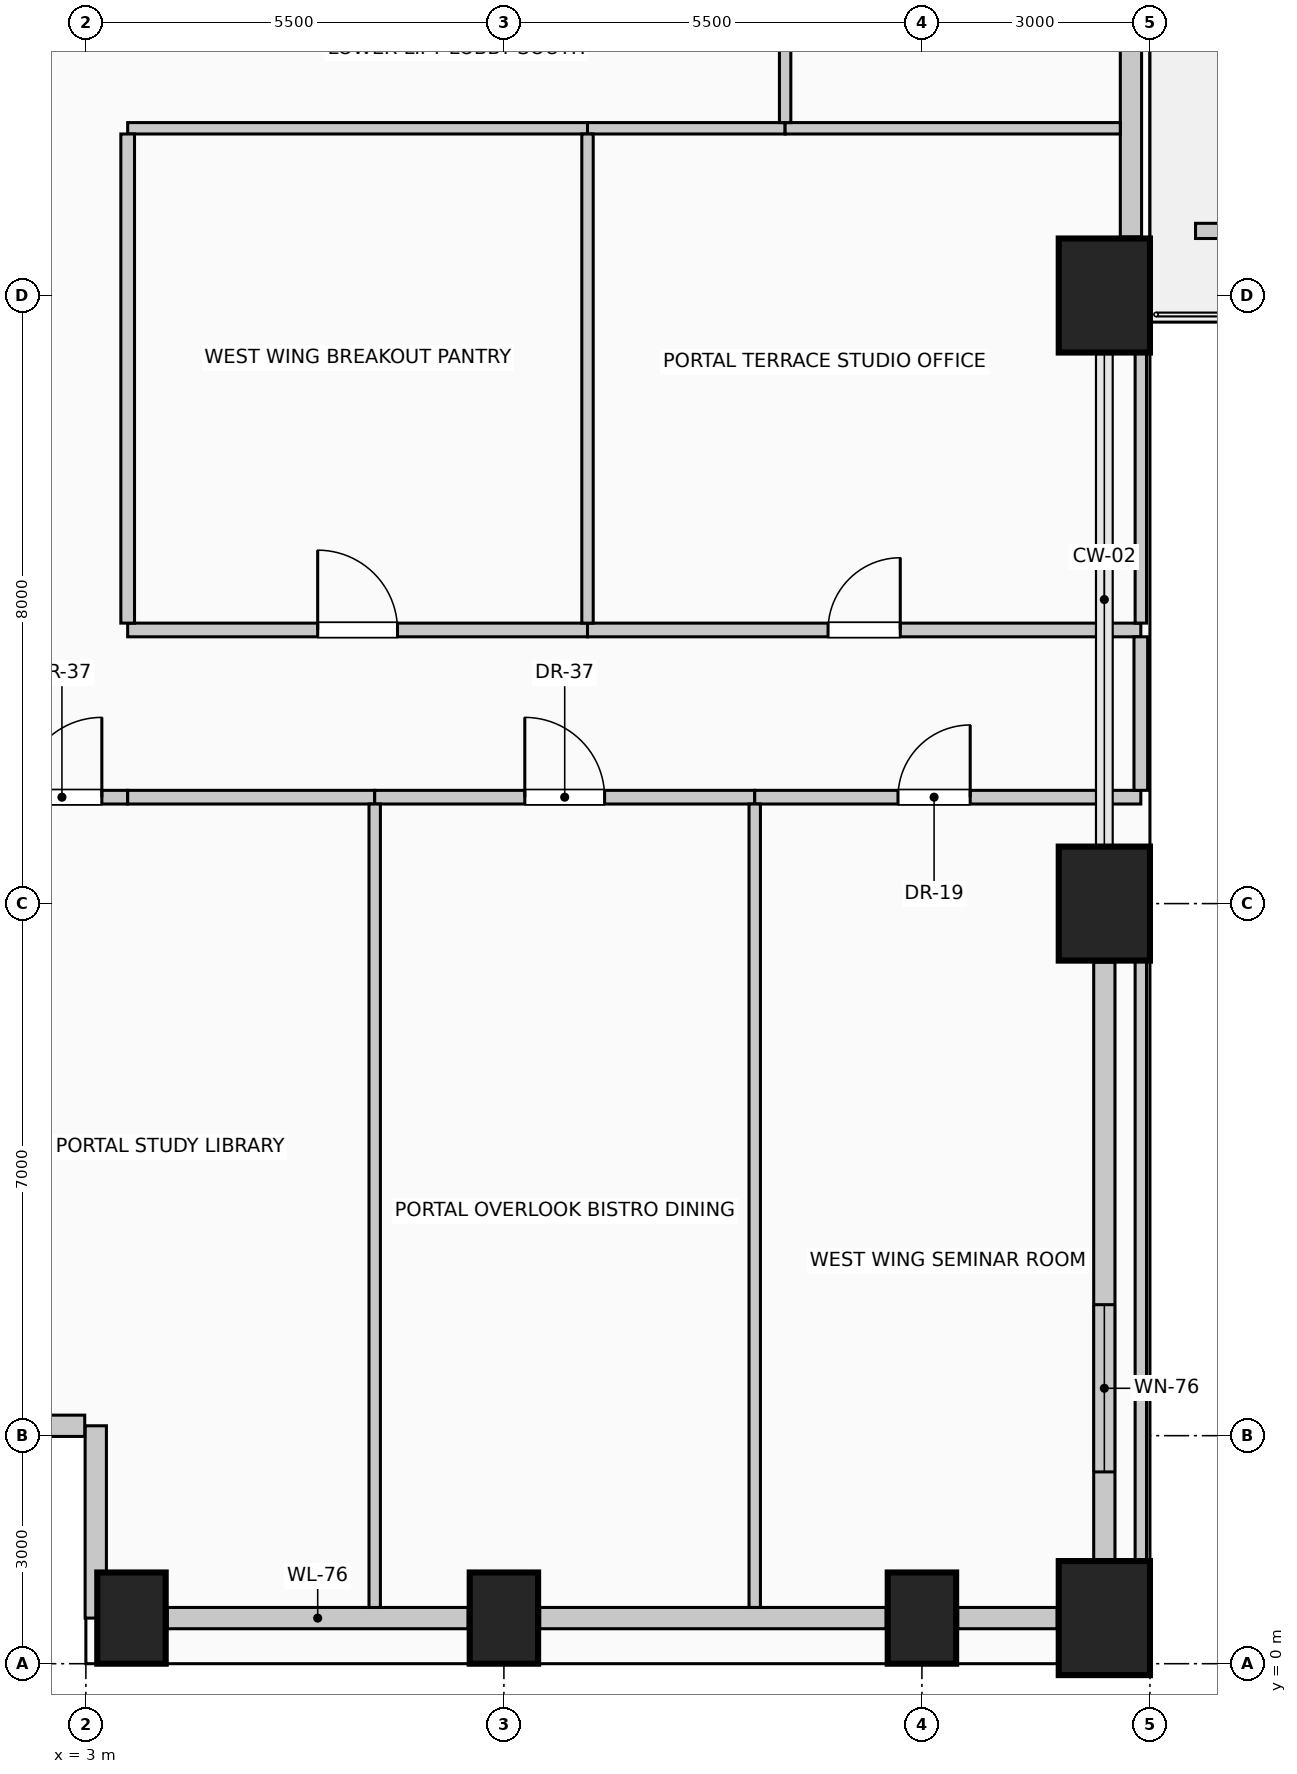
"""IFC4 building model, lengths in metres.
Left out: names, types, materials, properties, quantities, classifications, styles, units other than length and angle.
Written with IfcOpenShell. Run it as: python <this file> out.ifc"""

import sys

from ifc_helpers import new_model, si_unit, direction, frame, frame_2d, origin, origin_2d, place, context, subcontext, project, spatial, rectangle, extrude, element, fill, save


model = new_model("IFC4")
c1 = context("Model", 3, precision=1e-05, world=origin(), true_north=direction((0.0, 1.0)))
c2 = subcontext(c1, "Body", "Model", "MODEL_VIEW")
j1 = project(units=[si_unit("LENGTHUNIT", "METRE"), si_unit("PLANEANGLEUNIT", "RADIAN")], contexts=[c1])
p1 = place(None, origin())
s1 = spatial("IfcSite", under=j1, at=p1, CompositionType="ELEMENT")
p2 = place(p1, origin())
s2 = spatial("IfcBuilding", under=s1, at=p2, CompositionType="ELEMENT")
p3 = place(p2, frame((0.0, 0.0, 38.6)))
s3 = spatial("IfcBuildingStorey", under=s2, at=p3, CompositionType="ELEMENT", Elevation=38.6)
for number, where, z_axis, x_axis in (
    (1, (3.6, 0.6, 0.0), (0.0, 0.0, 1.0), (1.0, 0.0, 0.0)),
    (2, (8.5, 0.6, 0.0), (0.0, 0.0, 1.0), (1.0, 0.0, 0.0)),
    (3, (14.0, 0.6, 0.0), (0.0, 0.0, 1.0), (1.0, 0.0, 0.0)),
):
    element("IfcColumn", number, at=place(p3, frame(where, z_axis=z_axis, x_axis=x_axis)), inside=s3, PredefinedType="COLUMN", context=c2, shape_type="SweptSolid", body=[
        extrude(rectangle(XDim=0.9, YDim=1.2, at=origin_2d()), origin(), (0.0, 0.0, 1.0), 4.0),
    ])
for number, where, z_axis, x_axis in (
    (4, (16.4, 0.6, 0.0), (0.0, 0.0, 1.0), (1.0, 0.0, 0.0)),
    (5, (16.4, 10.0, 0.0), (0.0, 0.0, 1.0), (1.0, 0.0, 0.0)),
    (6, (16.4, 18.0, 0.0), (0.0, 0.0, 1.0), (1.0, 0.0, 0.0)),
):
    element("IfcColumn", number, at=place(p3, frame(where, z_axis=z_axis, x_axis=x_axis)), inside=s3, PredefinedType="COLUMN", context=c2, shape_type="SweptSolid", body=[
        extrude(rectangle(XDim=1.2, YDim=1.5, at=origin_2d()), origin(), (0.0, 0.0, 1.0), 4.0),
    ])
p4 = place(p3, frame((8.03, 0.6, 0.0), z_axis=(0.0, 0.0, 1.0), x_axis=(-1.0, 0.0, 0.0)))
e7 = element("IfcWall", 7, at=p4, inside=s3, PredefinedType="SOLIDWALL", context=c2, shape_type="SweptSolid", body=[
    extrude(rectangle(XDim=3.96, YDim=0.28, at=frame_2d((1.98, 0.0))), origin(), (0.0, 0.0, 1.0), 2.85),
])
p5 = place(p3, frame((13.53, 0.6, 0.0), z_axis=(0.0, 0.0, 1.0), x_axis=(-1.0, 0.0, 0.0)))
e8 = element("IfcWall", 8, at=p5, inside=s3, PredefinedType="SOLIDWALL", context=c2, shape_type="SweptSolid", body=[
    extrude(rectangle(XDim=4.56, YDim=0.28, at=frame_2d((2.28, 0.0))), origin(), (0.0, 0.0, 1.0), 2.85),
])
p6 = place(p3, frame((15.78, 0.6, 0.0), z_axis=(0.0, 0.0, 1.0), x_axis=(-1.0, 0.0, 0.0)))
e9 = element("IfcWall", 9, at=p6, inside=s3, PredefinedType="SOLIDWALL", context=c2, shape_type="SweptSolid", body=[
    extrude(rectangle(XDim=1.31, YDim=0.28, at=frame_2d((0.655, 0.0))), origin(), (0.0, 0.0, 1.0), 2.85),
])
p7 = place(p3, frame((3.13, 0.6, 0.0), z_axis=(0.0, 0.0, 1.0), x_axis=(0.0, 1.0, 0.0)))
e10 = element("IfcWall", 10, at=p7, inside=s3, PredefinedType="SOLIDWALL", context=c2, shape_type="SweptSolid", body=[
    extrude(rectangle(XDim=2.53, YDim=0.28, at=frame_2d((1.265, 0.0))), origin(), (0.0, 0.0, 1.0), 3.7),
])
p8 = place(p3, frame((2.985, 3.13, 0.0), z_axis=(0.0, 0.0, 1.0), x_axis=(-1.0, 0.0, 0.0)))
e11 = element("IfcWall", 11, at=p8, inside=s3, PredefinedType="SOLIDWALL", context=c2, shape_type="SweptSolid", body=[
    extrude(rectangle(XDim=2.385, YDim=0.28, at=frame_2d((1.192, 0.0))), origin(), (0.0, 0.0, 1.0), 3.7),
])
p9 = place(p3, frame((16.4, 9.23, 0.0), z_axis=(0.0, 0.0, 1.0), x_axis=(0.0, -1.0, 0.0)))
e12 = element("IfcWall", 12, at=p9, inside=s3, PredefinedType="SOLIDWALL", context=c2, shape_type="SweptSolid", body=[
    extrude(rectangle(XDim=7.86, YDim=0.28, at=frame_2d((3.93, 0.0))), origin(), (0.0, 0.0, 1.0), 3.0),
])
p10 = place(p9, frame((4.507, 0.0, 0.42)))
e13 = element("IfcOpeningElement", 13, at=p10, cuts=e12, PredefinedType="OPENING", context=c2, shape_type="SweptSolid", body=[
    extrude(rectangle(XDim=2.2, YDim=1.95, at=frame_2d((1.1, 0.975))), frame((0.0, 0.15, 0.0), z_axis=(0.0, -1.0, 0.0), x_axis=(1.0, 0.0, 0.0)), (0.0, 0.0, 1.0), 0.3),
])
p11 = place(p3, frame((16.75, 25.23, 0.0), z_axis=(0.0, 0.0, 1.0), x_axis=(0.0, -1.0, 0.0)))
e14 = element("IfcWall", 14, at=p11, inside=s3, PredefinedType="SOLIDWALL", context=c2, shape_type="SweptSolid", body=[
    extrude(rectangle(XDim=6.46, YDim=0.28, at=frame_2d((3.23, 0.0))), origin(), (0.0, 0.0, 1.0), 3.7),
])
p12 = place(p11, frame((2.63, 0.0, 0.0)))
e15 = element("IfcOpeningElement", 15, at=p12, cuts=e14, PredefinedType="OPENING", context=c2, shape_type="SweptSolid", body=[
    extrude(rectangle(XDim=1.2, YDim=2.25, at=frame_2d((0.6, 1.125))), frame((0.0, 0.15, 0.0), z_axis=(0.0, -1.0, 0.0), x_axis=(1.0, 0.0, 0.0)), (0.0, 0.0, 1.0), 0.3),
])
p13 = place(p3, frame((17.6, 18.85, 0.0), z_axis=(0.0, 0.0, 1.0), x_axis=(1.0, 0.0, 0.0)))
e16 = element("IfcWall", 16, at=p13, inside=s3, PredefinedType="USERDEFINED", context=c2, shape_type="SweptSolid", body=[
    extrude(rectangle(XDim=22.8, YDim=0.2, at=frame_2d((11.4, 0.0))), origin(), (0.0, 0.0, 1.0), 0.55),
])
p14 = place(p3, frame((0.74, 11.4, 0.0), z_axis=(0.0, 0.0, 1.0), x_axis=(1.0, 0.0, 0.0)))
e17 = element("IfcWall", 17, at=p14, inside=s3, PredefinedType="PARTITIONING", context=c2, shape_type="SweptSolid", body=[
    extrude(rectangle(XDim=2.81, YDim=0.18, at=frame_2d((1.405, 0.0))), origin(), (0.0, 0.0, 1.0), 3.095),
])
p15 = place(p14, frame((1.42, 0.0, 0.0)))
e18 = element("IfcOpeningElement", 18, at=p15, cuts=e17, PredefinedType="OPENING", context=c2, shape_type="SweptSolid", body=[
    extrude(rectangle(XDim=1.05, YDim=2.15, at=frame_2d((0.525, 1.075))), frame((0.0, 0.1, 0.0), z_axis=(0.0, -1.0, 0.0), x_axis=(1.0, 0.0, 0.0)), (0.0, 0.0, 1.0), 0.2),
])
p16 = place(p3, frame((3.55, 11.4, 0.0), z_axis=(0.0, 0.0, 1.0), x_axis=(1.0, 0.0, 0.0)))
e19 = element("IfcWall", 19, at=p16, inside=s3, PredefinedType="PARTITIONING", context=c2, shape_type="SweptSolid", body=[
    extrude(rectangle(XDim=3.25, YDim=0.18, at=frame_2d((1.625, 0.0))), origin(), (0.0, 0.0, 1.0), 3.095),
])
p17 = place(p3, frame((6.8, 11.4, 0.0), z_axis=(0.0, 0.0, 1.0), x_axis=(1.0, 0.0, 0.0)))
e20 = element("IfcWall", 20, at=p17, inside=s3, PredefinedType="PARTITIONING", context=c2, shape_type="SweptSolid", body=[
    extrude(rectangle(XDim=5.0, YDim=0.18, at=frame_2d((2.5, 0.0))), origin(), (0.0, 0.0, 1.0), 3.095),
])
p18 = place(p17, frame((1.975, 0.0, 0.0)))
e21 = element("IfcOpeningElement", 21, at=p18, cuts=e20, PredefinedType="OPENING", context=c2, shape_type="SweptSolid", body=[
    extrude(rectangle(XDim=1.05, YDim=2.15, at=frame_2d((0.525, 1.075))), frame((0.0, 0.1, 0.0), z_axis=(0.0, -1.0, 0.0), x_axis=(1.0, 0.0, 0.0)), (0.0, 0.0, 1.0), 0.2),
])
p19 = place(p3, frame((11.8, 11.4, 0.0), z_axis=(0.0, 0.0, 1.0), x_axis=(1.0, 0.0, 0.0)))
e22 = element("IfcWall", 22, at=p19, inside=s3, PredefinedType="PARTITIONING", context=c2, shape_type="SweptSolid", body=[
    extrude(rectangle(XDim=5.08, YDim=0.18, at=frame_2d((2.54, 0.0))), origin(), (0.0, 0.0, 1.0), 3.095),
])
p20 = place(p19, frame((1.885, 0.0, 0.0)))
e23 = element("IfcOpeningElement", 23, at=p20, cuts=e22, PredefinedType="OPENING", context=c2, shape_type="SweptSolid", body=[
    extrude(rectangle(XDim=0.95, YDim=2.15, at=frame_2d((0.475, 1.075))), frame((0.0, 0.1, 0.0), z_axis=(0.0, -1.0, 0.0), x_axis=(1.0, 0.0, 0.0)), (0.0, 0.0, 1.0), 0.2),
])
p21 = place(p3, frame((3.55, 13.6, 0.0), z_axis=(0.0, 0.0, 1.0), x_axis=(1.0, 0.0, 0.0)))
e24 = element("IfcWall", 24, at=p21, inside=s3, PredefinedType="PARTITIONING", context=c2, shape_type="SweptSolid", body=[
    extrude(rectangle(XDim=6.05, YDim=0.18, at=frame_2d((3.025, 0.0))), origin(), (0.0, 0.0, 1.0), 3.7),
])
p22 = place(p21, frame((2.5, 0.0, 0.0)))
e25 = element("IfcOpeningElement", 25, at=p22, cuts=e24, PredefinedType="OPENING", context=c2, shape_type="SweptSolid", body=[
    extrude(rectangle(XDim=1.05, YDim=2.15, at=frame_2d((0.525, 1.075))), frame((0.0, 0.1, 0.0), z_axis=(0.0, -1.0, 0.0), x_axis=(1.0, 0.0, 0.0)), (0.0, 0.0, 1.0), 0.2),
])
p23 = place(p3, frame((9.6, 13.6, 0.0), z_axis=(0.0, 0.0, 1.0), x_axis=(1.0, 0.0, 0.0)))
e26 = element("IfcWall", 26, at=p23, inside=s3, PredefinedType="PARTITIONING", context=c2, shape_type="SweptSolid", body=[
    extrude(rectangle(XDim=7.28, YDim=0.18, at=frame_2d((3.64, 0.0))), origin(), (0.0, 0.0, 1.0), 3.7),
])
p24 = place(p23, frame((3.165, 0.0, 0.0)))
e27 = element("IfcOpeningElement", 27, at=p24, cuts=e26, PredefinedType="OPENING", context=c2, shape_type="SweptSolid", body=[
    extrude(rectangle(XDim=0.95, YDim=2.15, at=frame_2d((0.475, 1.075))), frame((0.0, 0.1, 0.0), z_axis=(0.0, -1.0, 0.0), x_axis=(1.0, 0.0, 0.0)), (0.0, 0.0, 1.0), 0.2),
])
p25 = place(p3, frame((3.55, 20.2, 0.0), z_axis=(0.0, 0.0, 1.0), x_axis=(1.0, 0.0, 0.0)))
e28 = element("IfcWall", 28, at=p25, inside=s3, PredefinedType="PARTITIONING", context=c2, shape_type="SweptSolid", body=[
    extrude(rectangle(XDim=6.05, YDim=0.15, at=frame_2d((3.025, 0.0))), origin(), (0.0, 0.0, 1.0), 3.7),
])
p26 = place(p3, frame((9.6, 20.2, 0.0), z_axis=(0.0, 0.0, 1.0), x_axis=(1.0, 0.0, 0.0)))
e29 = element("IfcWall", 29, at=p26, inside=s3, PredefinedType="PARTITIONING", context=c2, shape_type="SweptSolid", body=[
    extrude(rectangle(XDim=2.6, YDim=0.15, at=frame_2d((1.3, 0.0))), origin(), (0.0, 0.0, 1.0), 3.7),
])
p27 = place(p3, frame((12.2, 20.2, 0.0), z_axis=(0.0, 0.0, 1.0), x_axis=(1.0, 0.0, 0.0)))
e30 = element("IfcWall", 30, at=p27, inside=s3, PredefinedType="PARTITIONING", context=c2, shape_type="SweptSolid", body=[
    extrude(rectangle(XDim=4.41, YDim=0.15, at=frame_2d((2.205, 0.0))), origin(), (0.0, 0.0, 1.0), 3.7),
])
p28 = place(p3, frame((3.55, 13.69, 0.0), z_axis=(0.0, 0.0, 1.0), x_axis=(0.0, 1.0, 0.0)))
e31 = element("IfcWall", 31, at=p28, inside=s3, PredefinedType="PARTITIONING", context=c2, shape_type="SweptSolid", body=[
    extrude(rectangle(XDim=6.435, YDim=0.18, at=frame_2d((3.218, 0.0))), origin(), (0.0, 0.0, 1.0), 3.7),
])
p29 = place(p3, frame((6.8, 0.74, 0.0), z_axis=(0.0, 0.0, 1.0), x_axis=(0.0, 1.0, 0.0)))
e32 = element("IfcWall", 32, at=p29, inside=s3, PredefinedType="PARTITIONING", context=c2, shape_type="SweptSolid", body=[
    extrude(rectangle(XDim=10.57, YDim=0.15, at=frame_2d((5.285, 0.0))), origin(), (0.0, 0.0, 1.0), 3.7),
])
p30 = place(p3, frame((9.6, 13.69, 0.0), z_axis=(0.0, 0.0, 1.0), x_axis=(0.0, 1.0, 0.0)))
e33 = element("IfcWall", 33, at=p30, inside=s3, PredefinedType="PARTITIONING", context=c2, shape_type="SweptSolid", body=[
    extrude(rectangle(XDim=6.435, YDim=0.15, at=frame_2d((3.218, 0.0))), origin(), (0.0, 0.0, 1.0), 3.7),
])
p31 = place(p3, frame((11.8, 0.74, 0.0), z_axis=(0.0, 0.0, 1.0), x_axis=(0.0, 1.0, 0.0)))
e34 = element("IfcWall", 34, at=p31, inside=s3, PredefinedType="PARTITIONING", context=c2, shape_type="SweptSolid", body=[
    extrude(rectangle(XDim=10.57, YDim=0.15, at=frame_2d((5.285, 0.0))), origin(), (0.0, 0.0, 1.0), 3.7),
])
p32 = place(p3, frame((12.2, 20.275, 0.0), z_axis=(0.0, 0.0, 1.0), x_axis=(0.0, 1.0, 0.0)))
e35 = element("IfcWall", 35, at=p32, inside=s3, PredefinedType="PARTITIONING", context=c2, shape_type="SweptSolid", body=[
    extrude(rectangle(XDim=1.825, YDim=0.15, at=frame_2d((0.913, 0.0))), origin(), (0.0, 0.0, 1.0), 3.7),
])
p33 = place(p3, frame((16.88, 1.35, 0.0), z_axis=(0.0, 0.0, 1.0), x_axis=(0.0, 1.0, 0.0)))
e36 = element("IfcWall", 36, at=p33, inside=s3, PredefinedType="PARTITIONING", context=c2, shape_type="SweptSolid", body=[
    extrude(rectangle(XDim=7.9, YDim=0.15, at=frame_2d((3.95, 0.0))), origin(), (0.0, 0.0, 1.0), 3.7),
])
p34 = place(p3, frame((16.88, 11.49, 0.0), z_axis=(0.0, 0.0, 1.0), x_axis=(0.0, 1.0, 0.0)))
e37 = element("IfcWall", 37, at=p34, inside=s3, PredefinedType="PARTITIONING", context=c2, shape_type="SweptSolid", body=[
    extrude(rectangle(XDim=2.02, YDim=0.18, at=frame_2d((1.01, 0.0))), origin(), (0.0, 0.0, 1.0), 3.7),
])
p35 = place(p3, frame((16.88, 13.69, 0.0), z_axis=(0.0, 0.0, 1.0), x_axis=(0.0, 1.0, 0.0)))
e38 = element("IfcWall", 38, at=p35, inside=s3, PredefinedType="PARTITIONING", context=c2, shape_type="SweptSolid", body=[
    extrude(rectangle(XDim=3.56, YDim=0.15, at=frame_2d((1.78, 0.0))), origin(), (0.0, 0.0, 1.0), 3.7),
])
p36 = place(p10, origin())
e39 = element("IfcWindow", 39, at=p36, inside=s3, PartitioningType="SINGLE_PANEL", PredefinedType="WINDOW", context=c2, shape_type="SweptSolid", body=[
    extrude(rectangle(XDim=2.2, YDim=1.95, at=frame_2d((1.1, 0.975))), frame((0.0, 0.03, 0.0), z_axis=(0.0, -1.0, 0.0), x_axis=(1.0, 0.0, 0.0)), (0.0, 0.0, 1.0), 0.06),
])
fill(e13, e39)
p37 = place(p15, origin())
e40 = element("IfcDoor", 40, at=p37, inside=s3, OperationType="SINGLE_SWING_RIGHT", PredefinedType="DOOR", context=c2, shape_type="SweptSolid", body=[
    extrude(rectangle(XDim=1.05, YDim=2.15, at=frame_2d((0.525, 1.075))), frame((0.0, 0.025, 0.0), z_axis=(0.0, -1.0, 0.0), x_axis=(1.0, 0.0, 0.0)), (0.0, 0.0, 1.0), 0.05),
])
fill(e18, e40)
p38 = place(p18, origin())
e41 = element("IfcDoor", 41, at=p38, inside=s3, OperationType="SINGLE_SWING_LEFT", PredefinedType="DOOR", context=c2, shape_type="SweptSolid", body=[
    extrude(rectangle(XDim=1.05, YDim=2.15, at=frame_2d((0.525, 1.075))), frame((0.0, 0.025, 0.0), z_axis=(0.0, -1.0, 0.0), x_axis=(1.0, 0.0, 0.0)), (0.0, 0.0, 1.0), 0.05),
])
fill(e21, e41)
p39 = place(p20, origin())
e42 = element("IfcDoor", 42, at=p39, inside=s3, OperationType="SINGLE_SWING_RIGHT", PredefinedType="DOOR", context=c2, shape_type="SweptSolid", body=[
    extrude(rectangle(XDim=0.95, YDim=2.15, at=frame_2d((0.475, 1.075))), frame((0.0, 0.025, 0.0), z_axis=(0.0, -1.0, 0.0), x_axis=(1.0, 0.0, 0.0)), (0.0, 0.0, 1.0), 0.05),
])
fill(e23, e42)
p40 = place(p22, origin())
e43 = element("IfcDoor", 43, at=p40, inside=s3, OperationType="SINGLE_SWING_LEFT", PredefinedType="DOOR", context=c2, shape_type="SweptSolid", body=[
    extrude(rectangle(XDim=1.05, YDim=2.15, at=frame_2d((0.525, 1.075))), frame((0.0, 0.025, 0.0), z_axis=(0.0, -1.0, 0.0), x_axis=(1.0, 0.0, 0.0)), (0.0, 0.0, 1.0), 0.05),
])
fill(e25, e43)
p41 = place(p24, origin())
e44 = element("IfcDoor", 44, at=p41, inside=s3, OperationType="SINGLE_SWING_RIGHT", PredefinedType="DOOR", context=c2, shape_type="SweptSolid", body=[
    extrude(rectangle(XDim=0.95, YDim=2.15, at=frame_2d((0.475, 1.075))), frame((0.0, 0.025, 0.0), z_axis=(0.0, -1.0, 0.0), x_axis=(1.0, 0.0, 0.0)), (0.0, 0.0, 1.0), 0.05),
])
fill(e27, e44)
save(model, sys.argv[1])
